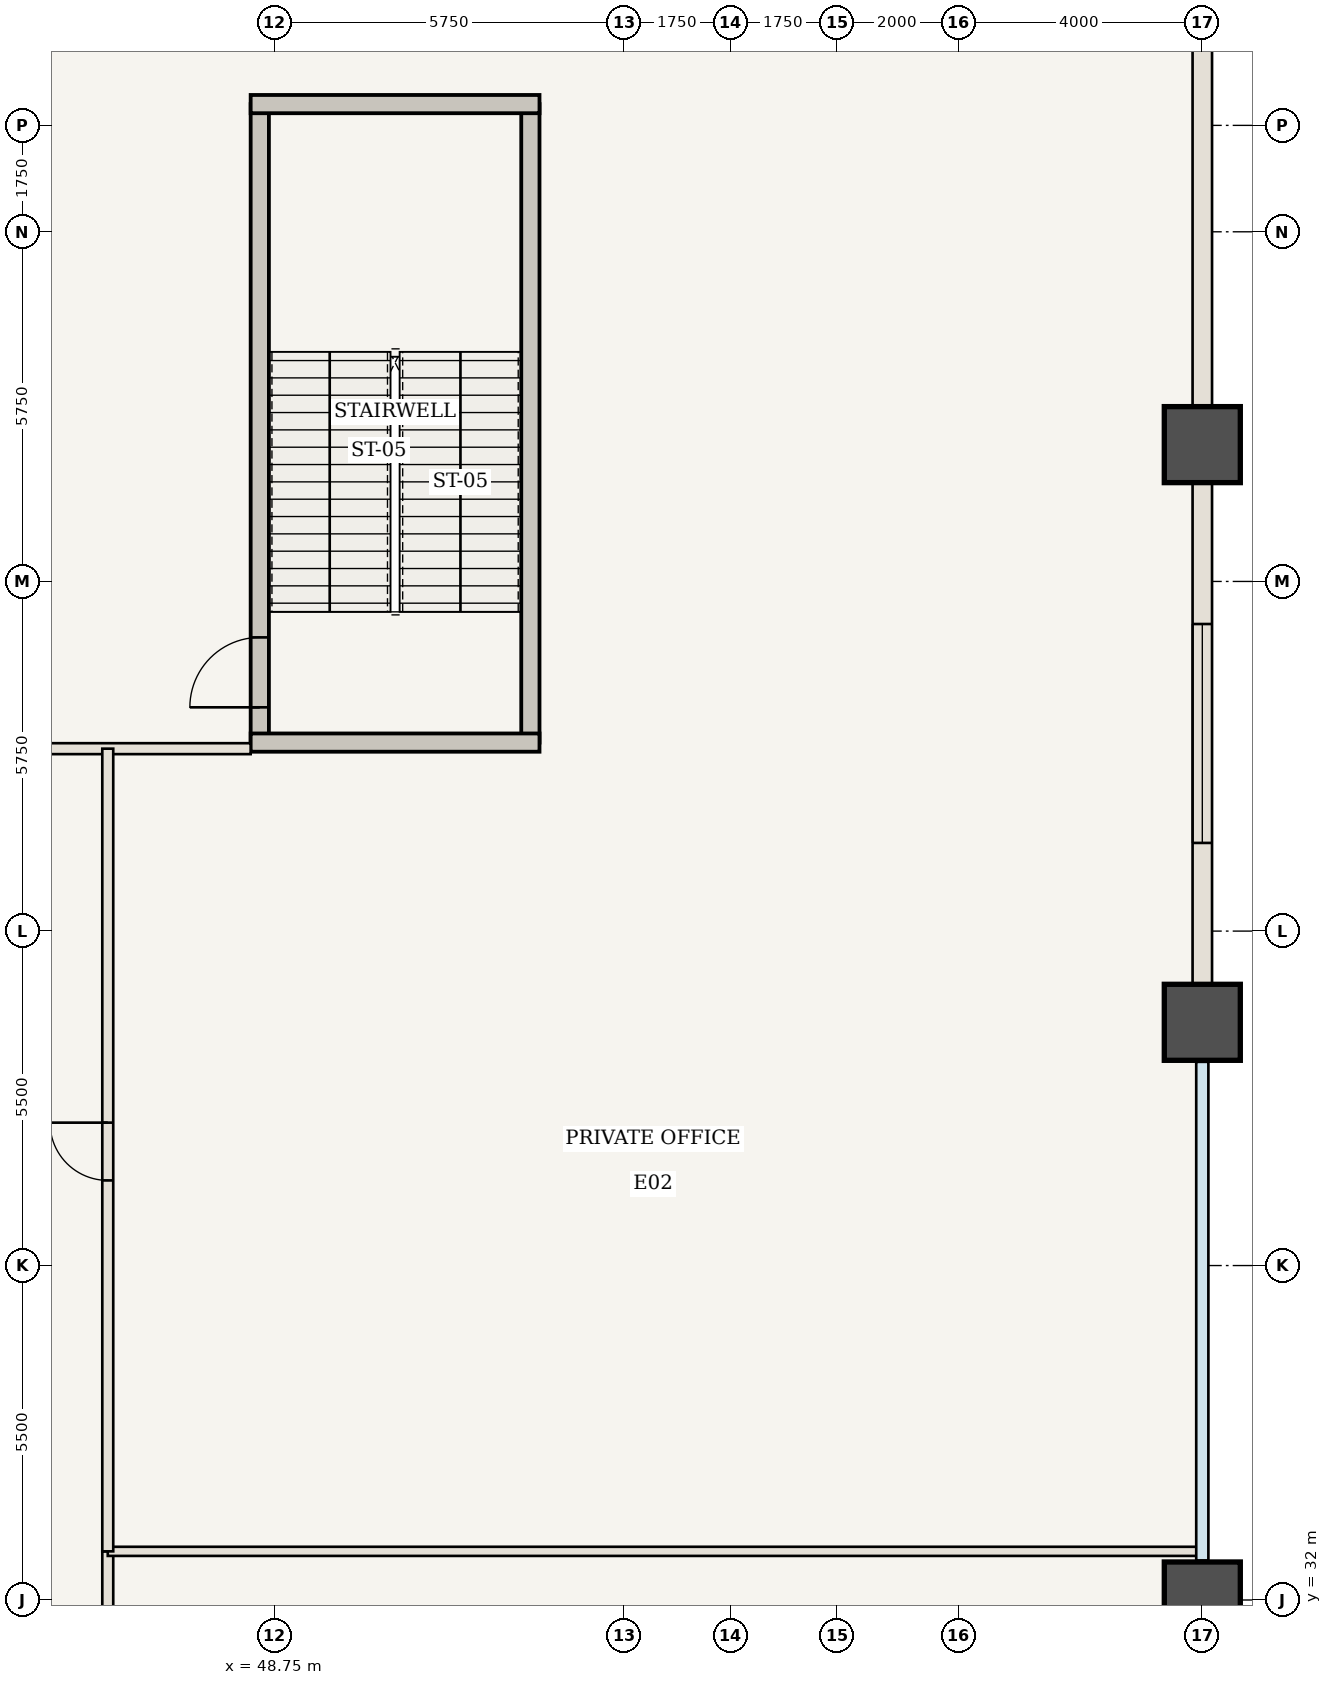
"""IFC4 building model, lengths in metres.
Left out: names, types, materials, properties, quantities, classifications, styles, units other than length and angle.
Written with IfcOpenShell. Run it as: python <this file> out.ifc"""

import sys

from ifc_helpers import new_model, si_unit, direction, frame, frame_2d, origin, origin_2d, place, context, subcontext, project, spatial, rectangle, extrude, element, fill, save


model = new_model("IFC4")
c1 = context("Model", 3, precision=1e-05, world=origin(), true_north=direction((0.0, 1.0)))
c2 = subcontext(c1, "Body", "Model", "MODEL_VIEW")
j1 = project(units=[si_unit("LENGTHUNIT", "METRE"), si_unit("PLANEANGLEUNIT", "RADIAN")], contexts=[c1])
p1 = place(None, origin())
s1 = spatial("IfcSite", under=j1, at=p1, CompositionType="ELEMENT")
p2 = place(p1, origin())
s2 = spatial("IfcBuilding", under=s1, at=p2, CompositionType="ELEMENT")
p3 = place(p2, frame((0.0, 0.0, 12.25)))
s3 = spatial("IfcBuildingStorey", under=s2, at=p3, CompositionType="ELEMENT", Elevation=12.25)
for number, where, z_axis, x_axis in (
    (1, (64.0, 32.0, 0.0), (0.0, 0.0, 1.0), (1.0, 0.0, 0.0)),
    (2, (64.0, 41.5, 0.0), (0.0, 0.0, 1.0), (1.0, 0.0, 0.0)),
    (3, (64.0, 51.0, 0.0), (0.0, 0.0, 1.0), (1.0, 0.0, 0.0)),
):
    element("IfcColumn", number, at=place(p3, frame(where, z_axis=z_axis, x_axis=x_axis)), inside=s3, PredefinedType="COLUMN", context=c2, shape_type="SweptSolid", body=[
        extrude(rectangle(XDim=1.25, YDim=1.25, at=origin_2d()), origin(), (0.0, 0.0, 1.0), 5.6),
    ])
p4 = place(p3, frame((48.5, 46.1, 0.0), z_axis=(0.0, 0.0, 1.0), x_axis=(0.0, 1.0, 0.0)))
e4 = element("IfcWall", 4, at=p4, inside=s3, PredefinedType="SHEAR", context=c2, shape_type="SweptSolid", body=[
    extrude(rectangle(XDim=10.5, YDim=0.3, at=frame_2d((5.25, 0.0))), origin(), (0.0, 0.0, 1.0), 5.36),
])
p5 = place(p4, frame((0.58, 0.0, 0.0)))
e5 = element("IfcOpeningElement", 5, at=p5, cuts=e4, PredefinedType="OPENING", context=c2, shape_type="SweptSolid", body=[
    extrude(rectangle(XDim=1.15, YDim=2.15, at=frame_2d((0.575, 1.075))), frame((0.0, 0.16, 0.0), z_axis=(0.0, -1.0, 0.0), x_axis=(1.0, 0.0, 0.0)), (0.0, 0.0, 1.0), 0.32),
])
p6 = place(p3, frame((52.95, 46.1, 0.0), z_axis=(0.0, 0.0, 1.0), x_axis=(0.0, 1.0, 0.0)))
e6 = element("IfcWall", 6, at=p6, inside=s3, PredefinedType="SHEAR", context=c2, shape_type="SweptSolid", body=[
    extrude(rectangle(XDim=10.5, YDim=0.3, at=frame_2d((5.25, 0.0))), origin(), (0.0, 0.0, 1.0), 5.36),
])
for number, where, z_axis, x_axis in (
    (7, (48.35, 46.1, 0.0), (0.0, 0.0, 1.0), (1.0, 0.0, 0.0)),
    (8, (48.35, 56.6, 0.0), (0.0, 0.0, 1.0), (1.0, 0.0, 0.0)),
):
    element("IfcWall", number, at=place(p3, frame(where, z_axis=z_axis, x_axis=x_axis)), inside=s3, PredefinedType="SHEAR", context=c2, shape_type="SweptSolid", body=[
        extrude(rectangle(XDim=4.75, YDim=0.3, at=frame_2d((2.375, 0.0))), origin(), (0.0, 0.0, 1.0), 5.36),
    ])
p7 = place(p3, frame((25.0, 46.0, 0.0), z_axis=(0.0, 0.0, 1.0), x_axis=(1.0, 0.0, 0.0)))
e9 = element("IfcWall", 9, at=p7, inside=s3, PredefinedType="STANDARD", context=c2, shape_type="SweptSolid", body=[
    extrude(rectangle(XDim=23.35, YDim=0.18, at=frame_2d((11.675, 0.0))), origin(), (0.0, 0.0, 1.0), 5.36),
])
p8 = place(p7, frame((9.975, 0.0, 0.0)))
e10 = element("IfcOpeningElement", 10, at=p8, cuts=e9, PredefinedType="OPENING", context=c2, shape_type="SweptSolid", body=[
    extrude(rectangle(XDim=0.95, YDim=2.15, at=frame_2d((0.475, 1.075))), frame((0.0, 0.1, 0.0), z_axis=(0.0, -1.0, 0.0), x_axis=(1.0, 0.0, 0.0)), (0.0, 0.0, 1.0), 0.2),
])
p9 = place(p3, frame((46.0, 18.0, 0.0), z_axis=(0.0, 0.0, 1.0), x_axis=(0.0, 1.0, 0.0)))
e11 = element("IfcWall", 11, at=p9, inside=s3, PredefinedType="STANDARD", context=c2, shape_type="SweptSolid", body=[
    extrude(rectangle(XDim=14.8, YDim=0.18, at=frame_2d((7.4, 0.0))), origin(), (0.0, 0.0, 1.0), 5.36),
])
p10 = place(p9, frame((6.9, 0.0, 0.0)))
e12 = element("IfcOpeningElement", 12, at=p10, cuts=e11, PredefinedType="OPENING", context=c2, shape_type="SweptSolid", body=[
    extrude(rectangle(XDim=0.95, YDim=2.15, at=frame_2d((0.475, 1.075))), frame((0.0, 0.1, 0.0), z_axis=(0.0, -1.0, 0.0), x_axis=(1.0, 0.0, 0.0)), (0.0, 0.0, 1.0), 0.2),
])
p11 = place(p3, frame((46.0, 32.8, 0.0), z_axis=(0.0, 0.0, 1.0), x_axis=(1.0, 0.0, 0.0)))
e13 = element("IfcWall", 13, at=p11, inside=s3, PredefinedType="STANDARD", context=c2, shape_type="SweptSolid", body=[
    extrude(rectangle(XDim=17.94, YDim=0.15, at=frame_2d((8.97, 0.0))), origin(), (0.0, 0.0, 1.0), 5.36),
])
p12 = place(p3, frame((46.0, 32.8, 0.0), z_axis=(0.0, 0.0, 1.0), x_axis=(0.0, 1.0, 0.0)))
e14 = element("IfcWall", 14, at=p12, inside=s3, PredefinedType="STANDARD", context=c2, shape_type="SweptSolid", body=[
    extrude(rectangle(XDim=13.2, YDim=0.18, at=frame_2d((6.6, 0.0))), origin(), (0.0, 0.0, 1.0), 5.36),
])
p13 = place(p12, frame((6.1, 0.0, 0.0)))
e15 = element("IfcOpeningElement", 15, at=p13, cuts=e14, PredefinedType="OPENING", context=c2, shape_type="SweptSolid", body=[
    extrude(rectangle(XDim=0.95, YDim=2.15, at=frame_2d((0.475, 1.075))), frame((0.0, 0.1, 0.0), z_axis=(0.0, -1.0, 0.0), x_axis=(1.0, 0.0, 0.0)), (0.0, 0.0, 1.0), 0.2),
])
p14 = place(p3, frame((64.0, 51.0, 0.0), z_axis=(0.0, 0.0, 1.0), x_axis=(0.0, -1.0, 0.0)))
e16 = element("IfcWall", 16, at=p14, inside=s3, PredefinedType="USERDEFINED", context=c2, shape_type="SweptSolid", body=[
    extrude(rectangle(XDim=9.5, YDim=0.32, at=frame_2d((4.75, 0.0))), origin(), (0.0, 0.0, 1.0), 4.46),
])
p15 = place(p14, frame((2.95, 0.0, 0.85)))
e17 = element("IfcOpeningElement", 17, at=p15, cuts=e16, PredefinedType="OPENING", context=c2, shape_type="SweptSolid", body=[
    extrude(rectangle(XDim=3.6, YDim=2.6, at=frame_2d((1.8, 1.3))), frame((0.0, 0.17, 0.0), z_axis=(0.0, -1.0, 0.0), x_axis=(1.0, 0.0, 0.0)), (0.0, 0.0, 1.0), 0.34),
])
p16 = place(p3, frame((64.0, 60.5, 0.0), z_axis=(0.0, 0.0, 1.0), x_axis=(0.0, -1.0, 0.0)))
e18 = element("IfcWall", 18, at=p16, inside=s3, PredefinedType="USERDEFINED", context=c2, shape_type="SweptSolid", body=[
    extrude(rectangle(XDim=9.5, YDim=0.32, at=frame_2d((4.75, 0.0))), origin(), (0.0, 0.0, 1.0), 4.46),
])
p17 = place(p5, origin())
e19 = element("IfcDoor", 19, at=p17, inside=s3, OperationType="SINGLE_SWING_LEFT", PredefinedType="DOOR", context=c2, shape_type="SweptSolid", body=[
    extrude(rectangle(XDim=1.15, YDim=2.15, at=frame_2d((0.575, 1.075))), frame((0.0, 0.025, 0.0), z_axis=(0.0, -1.0, 0.0), x_axis=(1.0, 0.0, 0.0)), (0.0, 0.0, 1.0), 0.05),
])
fill(e5, e19)
p18 = place(p13, origin())
e20 = element("IfcDoor", 20, at=p18, inside=s3, OperationType="SINGLE_SWING_RIGHT", PredefinedType="DOOR", context=c2, shape_type="SweptSolid", body=[
    extrude(rectangle(XDim=0.95, YDim=2.15, at=frame_2d((0.475, 1.075))), frame((0.0, 0.025, 0.0), z_axis=(0.0, -1.0, 0.0), x_axis=(1.0, 0.0, 0.0)), (0.0, 0.0, 1.0), 0.05),
])
fill(e15, e20)
p19 = place(p15, origin())
e21 = element("IfcWindow", 21, at=p19, inside=s3, PartitioningType="SINGLE_PANEL", PredefinedType="WINDOW", context=c2, shape_type="SweptSolid", body=[
    extrude(rectangle(XDim=3.6, YDim=2.6, at=frame_2d((1.8, 1.3))), frame((0.0, 0.03, 0.0), z_axis=(0.0, -1.0, 0.0), x_axis=(1.0, 0.0, 0.0)), (0.0, 0.0, 1.0), 0.06),
])
fill(e17, e21)
save(model, sys.argv[1])
